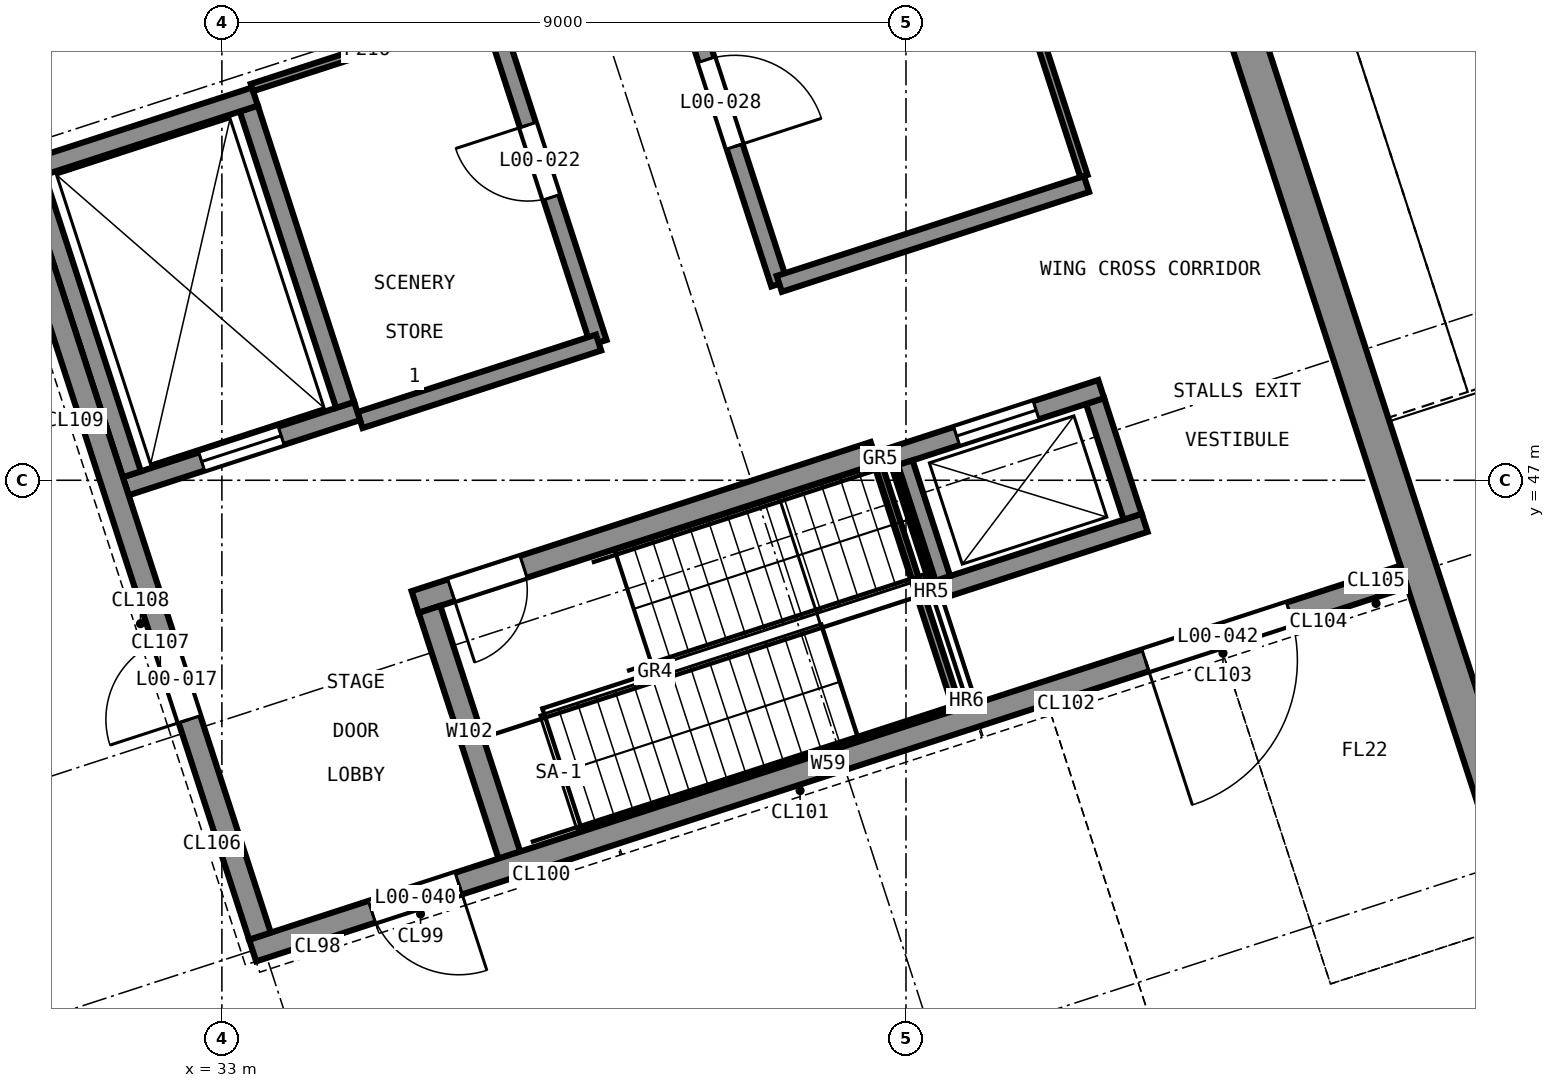
"""IFC4 building model, lengths in metres.
Left out: names, types, materials, properties, quantities, classifications, styles, units other than length and angle.
Written with IfcOpenShell. Run it as: python <this file> out.ifc"""

import sys

from ifc_helpers import new_model, si_unit, direction, frame, frame_2d, origin, place, context, subcontext, project, spatial, rectangle, extrude, element, fill, save


model = new_model("IFC4")
c1 = context("Model", 3, precision=1e-05, world=origin(), true_north=direction((0.0, 1.0)))
c2 = subcontext(c1, "Body", "Model", "MODEL_VIEW")
j1 = project(units=[si_unit("LENGTHUNIT", "METRE"), si_unit("PLANEANGLEUNIT", "RADIAN")], contexts=[c1])
p1 = place(None, origin())
s1 = spatial("IfcSite", under=j1, at=p1, CompositionType="ELEMENT")
p2 = place(p1, origin())
s2 = spatial("IfcBuilding", under=s1, at=p2, CompositionType="ELEMENT")
p3 = place(p2, origin())
s3 = spatial("IfcBuildingStorey", under=s2, at=p3, CompositionType="ELEMENT", Elevation=0.0)
p4 = place(p3, frame((49.93, 42.214, 0.0), z_axis=(0.0, 0.0, 1.0), x_axis=(-0.309016215614, 0.95105676933, 0.0)))
e1 = element("IfcWall", 1, at=p4, inside=s3, PredefinedType="SHEAR", context=c2, shape_type="SweptSolid", body=[
    extrude(rectangle(XDim=27.975, YDim=0.45, at=frame_2d((13.988, 0.0))), origin(), (0.0, 0.0, 1.0), 5.5),
])
p5 = place(p4, frame((13.775, 0.0, 0.0)))
e2 = element("IfcOpeningElement", 2, at=p5, cuts=e1, PredefinedType="OPENING", context=c2, shape_type="SweptSolid", body=[
    extrude(rectangle(XDim=2.0, YDim=2.4, at=frame_2d((1.0, 1.2))), frame((0.0, 0.235, 0.0), z_axis=(0.0, -1.0, 0.0), x_axis=(1.0, 0.0, 0.0)), (0.0, 0.0, 1.0), 0.47),
])
p6 = place(p3, frame((48.55, 45.735, 0.0), z_axis=(0.0, 0.0, 1.0), x_axis=(-0.951061216338, -0.309002528757, 0.0)))
e3 = element("IfcWall", 3, at=p6, inside=s3, PredefinedType="SOLIDWALL", context=c2, shape_type="SweptSolid", body=[
    extrude(rectangle(XDim=15.925, YDim=0.3, at=frame_2d((7.962, 0.0))), origin(), (0.0, 0.0, 1.0), 5.5),
])
p7 = place(p6, frame((13.075, 0.0, 0.0)))
e4 = element("IfcOpeningElement", 4, at=p7, cuts=e3, PredefinedType="OPENING", context=c2, shape_type="SweptSolid", body=[
    extrude(rectangle(XDim=1.2, YDim=2.1, at=frame_2d((0.6, 1.05))), frame((0.0, 0.16, 0.0), z_axis=(0.0, -1.0, 0.0), x_axis=(1.0, 0.0, 0.0)), (0.0, 0.0, 1.0), 0.32),
])
p8 = place(p6, frame((1.575, 0.0, 0.0)))
e5 = element("IfcOpeningElement", 5, at=p8, cuts=e3, PredefinedType="OPENING", context=c2, shape_type="SweptSolid", body=[
    extrude(rectangle(XDim=2.0, YDim=2.4, at=frame_2d((1.0, 1.2))), frame((0.0, 0.16, 0.0), z_axis=(0.0, -1.0, 0.0), x_axis=(1.0, 0.0, 0.0)), (0.0, 0.0, 1.0), 0.32),
])
p9 = place(p3, frame((33.501, 41.003, 0.0), z_axis=(0.0, 0.0, 1.0), x_axis=(-0.309017194826, 0.951056451165, 0.0)))
e6 = element("IfcWall", 6, at=p9, inside=s3, PredefinedType="SOLIDWALL", context=c2, shape_type="SweptSolid", body=[
    extrude(rectangle(XDim=53.7, YDim=0.3, at=frame_2d((26.85, 0.0))), origin(), (0.0, 0.0, 1.0), 5.5),
])
p10 = place(p9, frame((31.55, 0.0, 0.9)))
e7 = element("IfcOpeningElement", 7, at=p10, cuts=e6, PredefinedType="OPENING", context=c2, shape_type="SweptSolid", body=[
    extrude(rectangle(XDim=3.6, YDim=2.1, at=frame_2d((1.8, 1.05))), frame((0.0, 0.16, 0.0), z_axis=(0.0, -1.0, 0.0), x_axis=(1.0, 0.0, 0.0)), (0.0, 0.0, 1.0), 0.32),
])
p11 = place(p9, frame((3.0, 0.0, 0.0)))
e8 = element("IfcOpeningElement", 8, at=p11, cuts=e6, PredefinedType="OPENING", context=c2, shape_type="SweptSolid", body=[
    extrude(rectangle(XDim=1.1, YDim=2.1, at=frame_2d((0.55, 1.05))), frame((0.0, 0.16, 0.0), z_axis=(0.0, -1.0, 0.0), x_axis=(1.0, 0.0, 0.0)), (0.0, 0.0, 1.0), 0.32),
])
p12 = place(p9, frame((12.6, 0.0, 0.0)))
e9 = element("IfcOpeningElement", 9, at=p12, cuts=e6, PredefinedType="OPENING", context=c2, shape_type="SweptSolid", body=[
    extrude(rectangle(XDim=4.5, YDim=4.5, at=frame_2d((2.25, 2.25))), frame((0.0, 0.16, 0.0), z_axis=(0.0, -1.0, 0.0), x_axis=(1.0, 0.0, 0.0)), (0.0, 0.0, 1.0), 0.32),
])
p13 = place(p9, frame((19.1, 0.0, 0.0)))
e10 = element("IfcOpeningElement", 10, at=p13, cuts=e6, PredefinedType="OPENING", context=c2, shape_type="SweptSolid", body=[
    extrude(rectangle(XDim=4.5, YDim=4.5, at=frame_2d((2.25, 2.25))), frame((0.0, 0.16, 0.0), z_axis=(0.0, -1.0, 0.0), x_axis=(1.0, 0.0, 0.0)), (0.0, 0.0, 1.0), 0.32),
])
p14 = place(p3, frame((41.581, 47.361, 0.0), z_axis=(0.0, 0.0, 1.0), x_axis=(-0.951058929949, -0.309009565815, 0.0)))
e11 = element("IfcWall", 11, at=p14, inside=s3, PredefinedType="SOLIDWALL", context=c2, shape_type="SweptSolid", body=[
    extrude(rectangle(XDim=6.35, YDim=0.3, at=frame_2d((3.175, 0.0))), origin(), (0.0, 0.0, 1.0), 5.2),
])
p15 = place(p14, frame((4.85, 0.0, 0.0)))
e12 = element("IfcOpeningElement", 12, at=p15, cuts=e11, PredefinedType="OPENING", context=c2, shape_type="SweptSolid", body=[
    extrude(rectangle(XDim=1.0, YDim=2.1, at=frame_2d((0.5, 1.05))), frame((0.0, 0.16, 0.0), z_axis=(0.0, -1.0, 0.0), x_axis=(1.0, 0.0, 0.0)), (0.0, 0.0, 1.0), 0.32),
])
p16 = place(p3, frame((35.731, 45.302, 0.0), z_axis=(0.0, 0.0, 1.0), x_axis=(0.308980533303, -0.951068362443, 0.0)))
e13 = element("IfcWall", 13, at=p16, inside=s3, PredefinedType="SOLIDWALL", context=c2, shape_type="SweptSolid", body=[
    extrude(rectangle(XDim=3.4, YDim=0.3, at=frame_2d((1.7, 0.0))), origin(), (0.0, 0.0, 1.0), 5.2),
])
p17 = place(p3, frame((42.382, 45.544, 0.0), z_axis=(0.0, 0.0, 1.0), x_axis=(0.951071801089, 0.308969948659, 0.0)))
e14 = element("IfcWall", 14, at=p17, inside=s3, PredefinedType="SHEAR", context=c2, shape_type="SweptSolid", body=[
    extrude(rectangle(XDim=2.9, YDim=0.25, at=frame_2d((1.45, 0.0))), origin(), (0.0, 0.0, 1.0), 5.5),
])
p18 = place(p3, frame((44.982, 46.521, 0.0), z_axis=(0.0, 0.0, 1.0), x_axis=(-0.308986014439, 0.951066581729, 0.0)))
e15 = element("IfcWall", 15, at=p18, inside=s3, PredefinedType="SHEAR", context=c2, shape_type="SweptSolid", body=[
    extrude(rectangle(XDim=1.6, YDim=0.25, at=frame_2d((0.8, 0.0))), origin(), (0.0, 0.0, 1.0), 5.5),
])
p19 = place(p3, frame((44.568, 48.2, 0.0), z_axis=(0.0, 0.0, 1.0), x_axis=(-0.951047059821, -0.309046096893, 0.0)))
e16 = element("IfcWall", 16, at=p19, inside=s3, PredefinedType="SHEAR", context=c2, shape_type="SweptSolid", body=[
    extrude(rectangle(XDim=2.9, YDim=0.25, at=frame_2d((1.45, 0.0))), origin(), (0.0, 0.0, 1.0), 5.5),
])
p20 = place(p19, frame((0.9, 0.0, 0.0)))
e17 = element("IfcOpeningElement", 17, at=p20, cuts=e16, PredefinedType="OPENING", context=c2, shape_type="SweptSolid", body=[
    extrude(rectangle(XDim=1.1, YDim=2.1, at=frame_2d((0.55, 1.05))), frame((0.0, 0.135, 0.0), z_axis=(0.0, -1.0, 0.0), x_axis=(1.0, 0.0, 0.0)), (0.0, 0.0, 1.0), 0.27),
])
p21 = place(p3, frame((41.968, 47.224, 0.0), z_axis=(0.0, 0.0, 1.0), x_axis=(0.308986014439, -0.951066581729, 0.0)))
e18 = element("IfcWall", 18, at=p21, inside=s3, PredefinedType="SHEAR", context=c2, shape_type="SweptSolid", body=[
    extrude(rectangle(XDim=1.6, YDim=0.25, at=frame_2d((0.8, 0.0))), origin(), (0.0, 0.0, 1.0), 5.5),
])
p22 = place(p3, frame((31.735, 46.922, 0.0), z_axis=(0.0, 0.0, 1.0), x_axis=(0.95104415986, 0.309055020985, 0.0)))
e19 = element("IfcWall", 19, at=p22, inside=s3, PredefinedType="SHEAR", context=c2, shape_type="SweptSolid", body=[
    extrude(rectangle(XDim=3.2, YDim=0.25, at=frame_2d((1.6, 0.0))), origin(), (0.0, 0.0, 1.0), 5.5),
])
p23 = place(p22, frame((1.05, 0.0, 0.0)))
e20 = element("IfcOpeningElement", 20, at=p23, cuts=e19, PredefinedType="OPENING", context=c2, shape_type="SweptSolid", body=[
    extrude(rectangle(XDim=1.1, YDim=2.1, at=frame_2d((0.55, 1.05))), frame((0.0, 0.135, 0.0), z_axis=(0.0, -1.0, 0.0), x_axis=(1.0, 0.0, 0.0)), (0.0, 0.0, 1.0), 0.27),
])
p24 = place(p3, frame((34.621, 47.991, 0.0), z_axis=(0.0, 0.0, 1.0), x_axis=(-0.309055103076, 0.951044133184, 0.0)))
e21 = element("IfcWall", 21, at=p24, inside=s3, PredefinedType="SHEAR", context=c2, shape_type="SweptSolid", body=[
    extrude(rectangle(XDim=4.1, YDim=0.25, at=frame_2d((2.05, 0.0))), origin(), (0.0, 0.0, 1.0), 5.5),
])
p25 = place(p3, frame((33.434, 52.048, 0.0), z_axis=(0.0, 0.0, 1.0), x_axis=(-0.951066581729, -0.308986014439, 0.0)))
e22 = element("IfcWall", 22, at=p25, inside=s3, PredefinedType="SHEAR", context=c2, shape_type="SweptSolid", body=[
    extrude(rectangle(XDim=3.2, YDim=0.25, at=frame_2d((1.6, 0.0))), origin(), (0.0, 0.0, 1.0), 5.5),
])
p26 = place(p3, frame((30.548, 50.979, 0.0), z_axis=(0.0, 0.0, 1.0), x_axis=(0.309055103076, -0.951044133184, 0.0)))
e23 = element("IfcWall", 23, at=p26, inside=s3, PredefinedType="SHEAR", context=c2, shape_type="SweptSolid", body=[
    extrude(rectangle(XDim=4.1, YDim=0.25, at=frame_2d((2.05, 0.0))), origin(), (0.0, 0.0, 1.0), 5.5),
])
p27 = place(p3, frame((37.956, 48.812, 0.0), z_axis=(0.0, 0.0, 1.0), x_axis=(-0.30901736393, 0.951056396219, 0.0)))
e24 = element("IfcWall", 24, at=p27, inside=s3, PredefinedType="SOLIDWALL", context=c2, shape_type="SweptSolid", body=[
    extrude(rectangle(XDim=41.7, YDim=0.22, at=frame_2d((20.85, 0.0))), origin(), (0.0, 0.0, 1.0), 5.2),
])
p28 = place(p27, frame((2.009, 0.0, 0.0)))
e25 = element("IfcOpeningElement", 25, at=p28, cuts=e24, PredefinedType="OPENING", context=c2, shape_type="SweptSolid", body=[
    extrude(rectangle(XDim=1.0, YDim=2.1, at=frame_2d((0.5, 1.05))), frame((0.0, 0.12, 0.0), z_axis=(0.0, -1.0, 0.0), x_axis=(1.0, 0.0, 0.0)), (0.0, 0.0, 1.0), 0.24),
])
p29 = place(p27, frame((11.495, 0.0, 0.0)))
e26 = element("IfcOpeningElement", 26, at=p29, cuts=e24, PredefinedType="OPENING", context=c2, shape_type="SweptSolid", body=[
    extrude(rectangle(XDim=1.0, YDim=2.1, at=frame_2d((0.5, 1.05))), frame((0.0, 0.12, 0.0), z_axis=(0.0, -1.0, 0.0), x_axis=(1.0, 0.0, 0.0)), (0.0, 0.0, 1.0), 0.24),
])
p30 = place(p27, frame((21.7, 0.0, 0.0)))
e27 = element("IfcOpeningElement", 27, at=p30, cuts=e24, PredefinedType="OPENING", context=c2, shape_type="SweptSolid", body=[
    extrude(rectangle(XDim=1.2, YDim=2.1, at=frame_2d((0.6, 1.05))), frame((0.0, 0.12, 0.0), z_axis=(0.0, -1.0, 0.0), x_axis=(1.0, 0.0, 0.0)), (0.0, 0.0, 1.0), 0.24),
])
p31 = place(p27, frame((26.7, 0.0, 0.0)))
e28 = element("IfcOpeningElement", 28, at=p31, cuts=e24, PredefinedType="OPENING", context=c2, shape_type="SweptSolid", body=[
    extrude(rectangle(XDim=1.2, YDim=2.1, at=frame_2d((0.6, 1.05))), frame((0.0, 0.12, 0.0), z_axis=(0.0, -1.0, 0.0), x_axis=(1.0, 0.0, 0.0)), (0.0, 0.0, 1.0), 0.24),
])
p32 = place(p27, frame((31.739, 0.0, 0.0)))
e29 = element("IfcOpeningElement", 29, at=p32, cuts=e24, PredefinedType="OPENING", context=c2, shape_type="SweptSolid", body=[
    extrude(rectangle(XDim=1.2, YDim=2.1, at=frame_2d((0.6, 1.05))), frame((0.0, 0.12, 0.0), z_axis=(0.0, -1.0, 0.0), x_axis=(1.0, 0.0, 0.0)), (0.0, 0.0, 1.0), 0.24),
])
p33 = place(p3, frame((40.333, 49.584, 0.0), z_axis=(0.0, 0.0, 1.0), x_axis=(-0.309015643281, 0.951056955291, 0.0)))
e30 = element("IfcWall", 30, at=p33, inside=s3, PredefinedType="SOLIDWALL", context=c2, shape_type="SweptSolid", body=[
    extrude(rectangle(XDim=41.7, YDim=0.22, at=frame_2d((20.85, 0.0))), origin(), (0.0, 0.0, 1.0), 5.2),
])
p34 = place(p33, frame((1.9, 0.0, 0.0)))
e31 = element("IfcOpeningElement", 31, at=p34, cuts=e30, PredefinedType="OPENING", context=c2, shape_type="SweptSolid", body=[
    extrude(rectangle(XDim=1.2, YDim=2.1, at=frame_2d((0.6, 1.05))), frame((0.0, 0.12, 0.0), z_axis=(0.0, -1.0, 0.0), x_axis=(1.0, 0.0, 0.0)), (0.0, 0.0, 1.0), 0.24),
])
p35 = place(p33, frame((8.185, 0.0, 0.0)))
e32 = element("IfcOpeningElement", 32, at=p35, cuts=e30, PredefinedType="OPENING", context=c2, shape_type="SweptSolid", body=[
    extrude(rectangle(XDim=1.2, YDim=2.1, at=frame_2d((0.6, 1.05))), frame((0.0, 0.12, 0.0), z_axis=(0.0, -1.0, 0.0), x_axis=(1.0, 0.0, 0.0)), (0.0, 0.0, 1.0), 0.24),
])
p36 = place(p33, frame((16.475, 0.0, 0.0)))
e33 = element("IfcOpeningElement", 33, at=p36, cuts=e30, PredefinedType="OPENING", context=c2, shape_type="SweptSolid", body=[
    extrude(rectangle(XDim=1.0, YDim=2.1, at=frame_2d((0.5, 1.05))), frame((0.0, 0.12, 0.0), z_axis=(0.0, -1.0, 0.0), x_axis=(1.0, 0.0, 0.0)), (0.0, 0.0, 1.0), 0.24),
])
p37 = place(p33, frame((23.05, 0.0, 0.0)))
e34 = element("IfcOpeningElement", 34, at=p37, cuts=e30, PredefinedType="OPENING", context=c2, shape_type="SweptSolid", body=[
    extrude(rectangle(XDim=1.0, YDim=2.1, at=frame_2d((0.5, 1.05))), frame((0.0, 0.12, 0.0), z_axis=(0.0, -1.0, 0.0), x_axis=(1.0, 0.0, 0.0)), (0.0, 0.0, 1.0), 0.24),
])
p38 = place(p33, frame((27.3, 0.0, 0.0)))
e35 = element("IfcOpeningElement", 35, at=p38, cuts=e30, PredefinedType="OPENING", context=c2, shape_type="SweptSolid", body=[
    extrude(rectangle(XDim=1.0, YDim=2.1, at=frame_2d((0.5, 1.05))), frame((0.0, 0.12, 0.0), z_axis=(0.0, -1.0, 0.0), x_axis=(1.0, 0.0, 0.0)), (0.0, 0.0, 1.0), 0.24),
])
p39 = place(p33, frame((32.761, 0.0, 0.0)))
e36 = element("IfcOpeningElement", 36, at=p39, cuts=e30, PredefinedType="OPENING", context=c2, shape_type="SweptSolid", body=[
    extrude(rectangle(XDim=1.0, YDim=2.1, at=frame_2d((0.5, 1.05))), frame((0.0, 0.12, 0.0), z_axis=(0.0, -1.0, 0.0), x_axis=(1.0, 0.0, 0.0)), (0.0, 0.0, 1.0), 0.24),
])
p40 = place(p3, frame((34.817, 47.792, 0.0), z_axis=(0.0, 0.0, 1.0), x_axis=(0.951053095941, 0.309027520945, 0.0)))
e37 = element("IfcWall", 37, at=p40, inside=s3, PredefinedType="SOLIDWALL", context=c2, shape_type="SweptSolid", body=[
    extrude(rectangle(XDim=3.3, YDim=0.22, at=frame_2d((1.65, 0.0))), origin(), (0.0, 0.0, 1.0), 5.2),
])
p41 = place(p3, frame((40.333, 49.584, 0.0), z_axis=(0.0, 0.0, 1.0), x_axis=(0.951062770994, 0.308997743729, 0.0)))
e38 = element("IfcWall", 38, at=p41, inside=s3, PredefinedType="SOLIDWALL", context=c2, shape_type="SweptSolid", body=[
    extrude(rectangle(XDim=4.25, YDim=0.22, at=frame_2d((2.125, 0.0))), origin(), (0.0, 0.0, 1.0), 5.2),
])
p42 = place(p3, frame((33.396, 52.167, 0.0), z_axis=(0.0, 0.0, 1.0), x_axis=(0.951044192343, 0.309054921027, 0.0)))
e39 = element("IfcWall", 39, at=p42, inside=s3, PredefinedType="PARTITIONING", context=c2, shape_type="SweptSolid", body=[
    extrude(rectangle(XDim=3.19, YDim=0.1, at=frame_2d((1.595, 0.0))), origin(), (0.0, 0.0, 1.0), 5.2),
])
p43 = place(p3, frame((42.678, 43.985, 0.0), z_axis=(0.0, 0.0, 1.0), x_axis=(-0.309045481752, 0.951047259714, 0.0)))
e40 = element("IfcWall", 40, at=p43, inside=s3, PredefinedType="PARTITIONING", context=c2, shape_type="SweptSolid", body=[
    extrude(rectangle(XDim=3.4, YDim=0.1, at=frame_2d((1.7, 0.0))), origin(), (0.0, 0.0, 1.0), 5.2),
])
p44 = place(p3, frame((44.341, 51.002, 0.0), z_axis=(0.0, 0.0, 1.0), x_axis=(-0.309016547708, 0.951056661426, 0.0)))
e41 = element("IfcWall", 41, at=p44, inside=s3, PredefinedType="PARTITIONING", context=c2, shape_type="SweptSolid", body=[
    extrude(rectangle(XDim=11.99, YDim=0.1, at=frame_2d((5.995, 0.0))), origin(), (0.0, 0.0, 1.0), 5.2),
])
p45 = place(p20, origin())
e42 = element("IfcDoor", 42, at=p45, inside=s3, OperationType="SLIDING_TO_LEFT", PredefinedType="DOOR", context=c2, shape_type="SweptSolid", body=[
    extrude(rectangle(XDim=1.1, YDim=2.1, at=frame_2d((0.55, 1.05))), frame((0.0, 0.025, 0.0), z_axis=(0.0, -1.0, 0.0), x_axis=(1.0, 0.0, 0.0)), (0.0, 0.0, 1.0), 0.05),
])
fill(e17, e42)
p46 = place(p23, origin())
e43 = element("IfcDoor", 43, at=p46, inside=s3, OperationType="SLIDING_TO_LEFT", PredefinedType="DOOR", context=c2, shape_type="SweptSolid", body=[
    extrude(rectangle(XDim=1.1, YDim=2.1, at=frame_2d((0.55, 1.05))), frame((0.0, 0.025, 0.0), z_axis=(0.0, -1.0, 0.0), x_axis=(1.0, 0.0, 0.0)), (0.0, 0.0, 1.0), 0.05),
])
fill(e20, e43)
p47 = place(p11, origin())
e44 = element("IfcDoor", 44, at=p47, inside=s3, OperationType="SINGLE_SWING_RIGHT", PredefinedType="DOOR", context=c2, shape_type="SweptSolid", body=[
    extrude(rectangle(XDim=1.1, YDim=2.1, at=frame_2d((0.55, 1.05))), frame((0.0, 0.025, 0.0), z_axis=(0.0, -1.0, 0.0), x_axis=(1.0, 0.0, 0.0)), (0.0, 0.0, 1.0), 0.05),
])
fill(e8, e44)
p48 = place(p28, origin())
e45 = element("IfcDoor", 45, at=p48, inside=s3, OperationType="SINGLE_SWING_LEFT", PredefinedType="DOOR", context=c2, shape_type="SweptSolid", body=[
    extrude(rectangle(XDim=1.0, YDim=2.1, at=frame_2d((0.5, 1.05))), frame((0.0, 0.025, 0.0), z_axis=(0.0, -1.0, 0.0), x_axis=(1.0, 0.0, 0.0)), (0.0, 0.0, 1.0), 0.05),
])
fill(e25, e45)
p49 = place(p34, frame((1.2, 0.0, 0.0), z_axis=(0.0, 0.0, 1.0), x_axis=(-1.0, 0.0, 0.0)))
e46 = element("IfcDoor", 46, at=p49, inside=s3, OperationType="SINGLE_SWING_LEFT", PredefinedType="DOOR", context=c2, shape_type="SweptSolid", body=[
    extrude(rectangle(XDim=1.2, YDim=2.1, at=frame_2d((0.6, 1.05))), frame((0.0, 0.025, 0.0), z_axis=(0.0, -1.0, 0.0), x_axis=(1.0, 0.0, 0.0)), (0.0, 0.0, 1.0), 0.05),
])
fill(e31, e46)
p50 = place(p15, origin())
e47 = element("IfcDoor", 47, at=p50, inside=s3, OperationType="SINGLE_SWING_LEFT", PredefinedType="DOOR", context=c2, shape_type="SweptSolid", body=[
    extrude(rectangle(XDim=1.0, YDim=2.1, at=frame_2d((0.5, 1.05))), frame((0.0, 0.025, 0.0), z_axis=(0.0, -1.0, 0.0), x_axis=(1.0, 0.0, 0.0)), (0.0, 0.0, 1.0), 0.05),
])
fill(e12, e47)
p51 = place(p7, origin())
e48 = element("IfcDoor", 48, at=p51, inside=s3, OperationType="SINGLE_SWING_RIGHT", PredefinedType="DOOR", context=c2, shape_type="SweptSolid", body=[
    extrude(rectangle(XDim=1.2, YDim=2.1, at=frame_2d((0.6, 1.05))), frame((0.0, 0.025, 0.0), z_axis=(0.0, -1.0, 0.0), x_axis=(1.0, 0.0, 0.0)), (0.0, 0.0, 1.0), 0.05),
])
fill(e4, e48)
p52 = place(p8, origin())
e49 = element("IfcDoor", 49, at=p52, inside=s3, OperationType="DOUBLE_DOOR_SINGLE_SWING", PredefinedType="DOOR", context=c2, shape_type="SweptSolid", body=[
    extrude(rectangle(XDim=2.0, YDim=2.4, at=frame_2d((1.0, 1.2))), frame((0.0, 0.025, 0.0), z_axis=(0.0, -1.0, 0.0), x_axis=(1.0, 0.0, 0.0)), (0.0, 0.0, 1.0), 0.05),
])
fill(e5, e49)
save(model, sys.argv[1])
